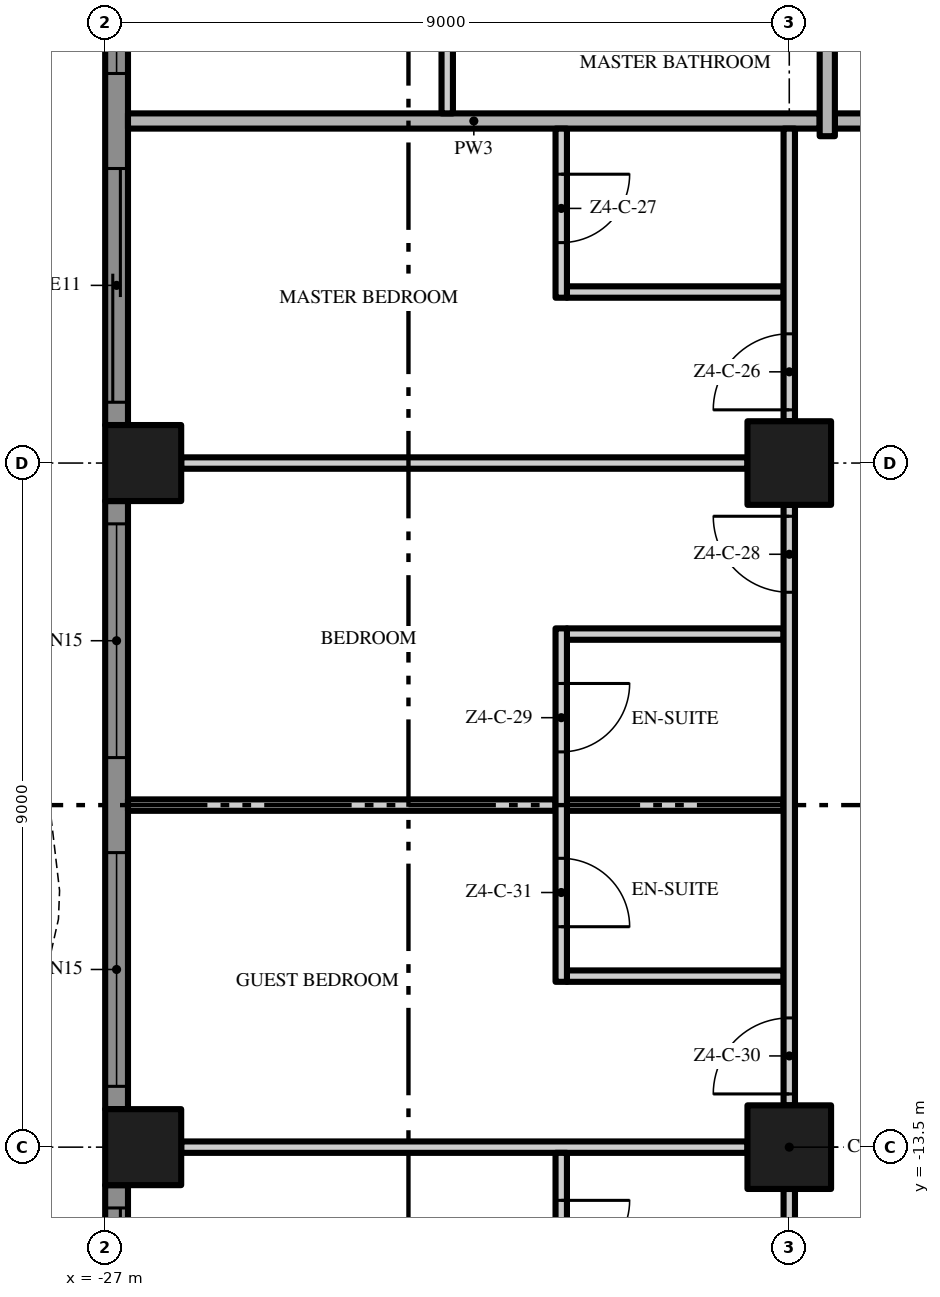
"""IFC4 building model, lengths in metres.
Left out: names, types, materials, properties, quantities, classifications, styles, units other than length and angle.
Written with IfcOpenShell. Run it as: python <this file> out.ifc"""

import sys

from ifc_helpers import new_model, si_unit, direction, frame, frame_2d, origin, origin_2d, place, context, subcontext, project, spatial, polyline, rectangle, outline, extrude, element, fill, save


model = new_model("IFC4")
c1 = context("Model", 3, precision=1e-05, world=origin(), true_north=direction((0.0, 1.0)))
c2 = subcontext(c1, "Body", "Model", "MODEL_VIEW")
j1 = project(units=[si_unit("LENGTHUNIT", "METRE"), si_unit("PLANEANGLEUNIT", "RADIAN")], contexts=[c1])
p1 = place(None, origin())
s1 = spatial("IfcSite", under=j1, at=p1, CompositionType="ELEMENT")
p2 = place(p1, origin())
s2 = spatial("IfcBuilding", under=s1, at=p2, CompositionType="ELEMENT")
p3 = place(p2, frame((0.0, 0.0, 207.2)))
s3 = spatial("IfcBuildingStorey", under=s2, at=p3, CompositionType="ELEMENT", Elevation=207.2)
for number, where, z_axis, x_axis in (
    (1, (-18.0, -13.5, 0.0), (0.0, 0.0, 1.0), (1.0, 0.0, 0.0)),
    (2, (-18.0, -4.5, 0.0), (0.0, 0.0, 1.0), (1.0, 0.0, 0.0)),
):
    element("IfcColumn", number, at=place(p3, frame(where, z_axis=z_axis, x_axis=x_axis)), inside=s3, PredefinedType="COLUMN", context=c2, shape_type="SweptSolid", body=[
        extrude(rectangle(XDim=1.1, YDim=1.1, at=origin_2d()), origin(), (0.0, 0.0, 1.0), 3.5),
    ])
for number, where, z_axis, x_axis in (
    (3, (-26.5, -13.5, 0.0), (0.0, 0.0, 1.0), (1.0, 0.0, 0.0)),
    (4, (-26.5, -4.5, 0.0), (0.0, 0.0, 1.0), (1.0, 0.0, 0.0)),
):
    element("IfcColumn", number, at=place(p3, frame(where, z_axis=z_axis, x_axis=x_axis)), inside=s3, PredefinedType="COLUMN", context=c2, shape_type="SweptSolid", body=[
        extrude(rectangle(XDim=1.0, YDim=1.0, at=origin_2d()), origin(), (0.0, 0.0, 1.0), 3.5),
    ])
p4 = place(p3, frame((-26.85, -4.0, 0.0), z_axis=(0.0, 0.0, 1.0), x_axis=(0.0, 1.0, 0.0)))
e5 = element("IfcWall", 5, at=p4, inside=s3, PredefinedType="SOLIDWALL", context=c2, shape_type="SweptSolid", body=[
    extrude(rectangle(XDim=8.0, YDim=0.3, at=frame_2d((4.0, 0.0))), origin(), (0.0, 0.0, 1.0), 3.5),
])
p5 = place(p4, frame((4.625, 0.0, 0.45)))
e6 = element("IfcOpeningElement", 6, at=p5, cuts=e5, PredefinedType="OPENING", context=c2, shape_type="SweptSolid", body=[
    extrude(rectangle(XDim=3.075, YDim=2.65, at=frame_2d((1.538, 1.325))), frame((0.0, 0.16, 0.0), z_axis=(0.0, -1.0, 0.0), x_axis=(1.0, 0.0, 0.0)), (0.0, 0.0, 1.0), 0.32),
])
p6 = place(p4, frame((0.3, 0.0, 0.0)))
e7 = element("IfcOpeningElement", 7, at=p6, cuts=e5, PredefinedType="OPENING", context=c2, shape_type="SweptSolid", body=[
    extrude(rectangle(XDim=3.075, YDim=2.4, at=frame_2d((1.538, 1.2))), frame((0.0, 0.16, 0.0), z_axis=(0.0, -1.0, 0.0), x_axis=(1.0, 0.0, 0.0)), (0.0, 0.0, 1.0), 0.32),
])
p7 = place(p3, frame((-26.85, -13.0, 0.0), z_axis=(0.0, 0.0, 1.0), x_axis=(0.0, 1.0, 0.0)))
e8 = element("IfcWall", 8, at=p7, inside=s3, PredefinedType="SOLIDWALL", context=c2, shape_type="SweptSolid", body=[
    extrude(rectangle(XDim=8.0, YDim=0.3, at=frame_2d((4.0, 0.0))), origin(), (0.0, 0.0, 1.0), 3.5),
])
p8 = place(p7, frame((4.625, 0.0, 0.45)))
e9 = element("IfcOpeningElement", 9, at=p8, cuts=e8, PredefinedType="OPENING", context=c2, shape_type="SweptSolid", body=[
    extrude(rectangle(XDim=3.075, YDim=2.65, at=frame_2d((1.538, 1.325))), frame((0.0, 0.16, 0.0), z_axis=(0.0, -1.0, 0.0), x_axis=(1.0, 0.0, 0.0)), (0.0, 0.0, 1.0), 0.32),
])
p9 = place(p7, frame((0.3, 0.0, 0.45)))
e10 = element("IfcOpeningElement", 10, at=p9, cuts=e8, PredefinedType="OPENING", context=c2, shape_type="SweptSolid", body=[
    extrude(rectangle(XDim=3.075, YDim=2.65, at=frame_2d((1.538, 1.325))), frame((0.0, 0.16, 0.0), z_axis=(0.0, -1.0, 0.0), x_axis=(1.0, 0.0, 0.0)), (0.0, 0.0, 1.0), 0.32),
])
p10 = place(p3, frame((-26.85, -18.0, 0.0), z_axis=(0.0, 0.0, 1.0), x_axis=(0.0, 1.0, 0.0)))
e11 = element("IfcWall", 11, at=p10, inside=s3, PredefinedType="SOLIDWALL", context=c2, shape_type="SweptSolid", body=[
    extrude(rectangle(XDim=4.0, YDim=0.3, at=frame_2d((2.0, 0.0))), origin(), (0.0, 0.0, 1.0), 3.5),
])
p11 = place(p10, frame((0.625, 0.0, 0.0)))
e12 = element("IfcOpeningElement", 12, at=p11, cuts=e11, PredefinedType="OPENING", context=c2, shape_type="SweptSolid", body=[
    extrude(rectangle(XDim=3.075, YDim=2.4, at=frame_2d((1.538, 1.2))), frame((0.0, 0.16, 0.0), z_axis=(0.0, -1.0, 0.0), x_axis=(1.0, 0.0, 0.0)), (0.0, 0.0, 1.0), 0.32),
])
p12 = place(p3, origin())
e13 = element("IfcWall", 13, at=p12, inside=s3, PredefinedType="USERDEFINED", context=c2, shape_type="SweptSolid", body=[
    extrude(outline(polyline([(-27.951, 18.0), (-28.612, 16.5), (-29.345, 15.0), (-29.869, 13.5), (-30.0, 12.375), (-29.985, 12.0), (-29.649, 10.5), (-28.988, 9.0), (-28.255, 7.5), (-27.731, 6.0), (-27.6, 4.875), (-27.615, 4.5), (-27.951, 3.0), (-28.612, 1.5), (-29.345, 0.0), (-29.869, -1.5), (-30.0, -2.625), (-29.985, -3.0), (-29.649, -4.5), (-28.988, -6.0), (-28.255, -7.5), (-27.731, -9.0), (-27.6, -10.125), (-27.615, -10.5), (-27.951, -12.0), (-28.612, -13.5), (-29.345, -15.0), (-29.869, -16.5), (-30.0, -17.625), (-29.985, -18.0), (-29.735, -17.99), (-29.749, -17.635), (-29.624, -16.556), (-29.114, -15.096), (-28.385, -13.605), (-27.713, -12.079), (-27.366, -10.533), (-27.349, -10.115), (-27.486, -8.944), (-28.024, -7.404), (-28.761, -5.895), (-29.41, -4.421), (-29.736, -2.967), (-29.749, -2.635), (-29.624, -1.556), (-29.114, -0.096), (-28.385, 1.395), (-27.713, 2.921), (-27.366, 4.467), (-27.349, 4.885), (-27.486, 6.056), (-28.024, 7.596), (-28.761, 9.105), (-29.41, 10.579), (-29.736, 12.033), (-29.749, 12.365), (-29.624, 13.444), (-29.114, 14.904), (-28.385, 16.395), (-27.723, 17.899), (-27.951, 18.0)])), origin(), (0.0, 0.0, 1.0), 0.9),
])
p13 = place(p3, frame((-26.0, -13.5, 0.0), z_axis=(0.0, 0.0, 1.0), x_axis=(1.0, 0.0, 0.0)))
e14 = element("IfcWall", 14, at=p13, inside=s3, PredefinedType="PARTITIONING", context=c2, shape_type="SweptSolid", body=[
    extrude(rectangle(XDim=7.45, YDim=0.15, at=frame_2d((3.725, 0.0))), origin(), (0.0, 0.0, 1.0), 3.5),
])
p14 = place(p3, frame((-20.925, -11.25, 0.0), z_axis=(0.0, 0.0, 1.0), x_axis=(1.0, 0.0, 0.0)))
e15 = element("IfcWall", 15, at=p14, inside=s3, PredefinedType="PARTITIONING", context=c2, shape_type="SweptSolid", body=[
    extrude(rectangle(XDim=2.85, YDim=0.15, at=frame_2d((1.425, 0.0))), origin(), (0.0, 0.0, 1.0), 3.5),
])
p15 = place(p3, frame((-26.7, -9.0, 0.0), z_axis=(0.0, 0.0, 1.0), x_axis=(1.0, 0.0, 0.0)))
e16 = element("IfcWall", 16, at=p15, inside=s3, PredefinedType="PARTITIONING", context=c2, shape_type="SweptSolid", body=[
    extrude(rectangle(XDim=5.625, YDim=0.15, at=frame_2d((2.812, 0.0))), origin(), (0.0, 0.0, 1.0), 3.5),
])
for number, where, z_axis, x_axis in (
    (17, (-20.925, -9.0, 0.0), (0.0, 0.0, 1.0), (1.0, 0.0, 0.0)),
    (18, (-20.925, -6.75, 0.0), (0.0, 0.0, 1.0), (1.0, 0.0, 0.0)),
):
    element("IfcWall", number, at=place(p3, frame(where, z_axis=z_axis, x_axis=x_axis)), inside=s3, PredefinedType="PARTITIONING", context=c2, shape_type="SweptSolid", body=[
        extrude(rectangle(XDim=2.85, YDim=0.15, at=frame_2d((1.425, 0.0))), origin(), (0.0, 0.0, 1.0), 3.5),
    ])
p16 = place(p3, frame((-26.0, -4.5, 0.0), z_axis=(0.0, 0.0, 1.0), x_axis=(1.0, 0.0, 0.0)))
e19 = element("IfcWall", 19, at=p16, inside=s3, PredefinedType="PARTITIONING", context=c2, shape_type="SweptSolid", body=[
    extrude(rectangle(XDim=7.45, YDim=0.15, at=frame_2d((3.725, 0.0))), origin(), (0.0, 0.0, 1.0), 3.5),
])
p17 = place(p3, frame((-20.925, -2.25, 0.0), z_axis=(0.0, 0.0, 1.0), x_axis=(1.0, 0.0, 0.0)))
e20 = element("IfcWall", 20, at=p17, inside=s3, PredefinedType="PARTITIONING", context=c2, shape_type="SweptSolid", body=[
    extrude(rectangle(XDim=2.85, YDim=0.15, at=frame_2d((1.425, 0.0))), origin(), (0.0, 0.0, 1.0), 3.5),
])
p18 = place(p3, frame((-17.4, 0.0, 0.0), z_axis=(0.0, 0.0, 1.0), x_axis=(1.0, 0.0, 0.0)))
e21 = element("IfcWall", 21, at=p18, inside=s3, PredefinedType="PARTITIONING", context=c2, shape_type="SweptSolid", body=[
    extrude(rectangle(XDim=12.8, YDim=0.2, at=frame_2d((6.4, 0.0))), origin(), (0.0, 0.0, 1.0), 3.5),
])
p19 = place(p3, frame((-26.7, 0.0, 0.0), z_axis=(0.0, 0.0, 1.0), x_axis=(1.0, 0.0, 0.0)))
e22 = element("IfcWall", 22, at=p19, inside=s3, PredefinedType="PARTITIONING", context=c2, shape_type="SweptSolid", body=[
    extrude(rectangle(XDim=9.1, YDim=0.2, at=frame_2d((4.55, 0.0))), origin(), (0.0, 0.0, 1.0), 3.5),
])
p20 = place(p3, frame((-22.5, 0.1, 0.0), z_axis=(0.0, 0.0, 1.0), x_axis=(0.0, 1.0, 0.0)))
e23 = element("IfcWall", 23, at=p20, inside=s3, PredefinedType="PARTITIONING", context=c2, shape_type="SweptSolid", body=[
    extrude(rectangle(XDim=17.4, YDim=0.15, at=frame_2d((8.7, 0.0))), origin(), (0.0, 0.0, 1.0), 3.5),
])
p21 = place(p20, frame((1.65, 0.0, 0.0)))
e24 = element("IfcOpeningElement", 24, at=p21, cuts=e23, PredefinedType="OPENING", context=c2, shape_type="SweptSolid", body=[
    extrude(rectangle(XDim=1.0, YDim=2.4, at=frame_2d((0.5, 1.2))), frame((0.0, 0.085, 0.0), z_axis=(0.0, -1.0, 0.0), x_axis=(1.0, 0.0, 0.0)), (0.0, 0.0, 1.0), 0.17),
])
p22 = place(p20, frame((7.25, 0.0, 0.0)))
e25 = element("IfcOpeningElement", 25, at=p22, cuts=e23, PredefinedType="OPENING", context=c2, shape_type="SweptSolid", body=[
    extrude(rectangle(XDim=1.0, YDim=2.4, at=frame_2d((0.5, 1.2))), frame((0.0, 0.085, 0.0), z_axis=(0.0, -1.0, 0.0), x_axis=(1.0, 0.0, 0.0)), (0.0, 0.0, 1.0), 0.17),
])
p23 = place(p20, frame((9.5, 0.0, 0.0)))
e26 = element("IfcOpeningElement", 26, at=p23, cuts=e23, PredefinedType="OPENING", context=c2, shape_type="SweptSolid", body=[
    extrude(rectangle(XDim=1.0, YDim=2.4, at=frame_2d((0.5, 1.2))), frame((0.0, 0.085, 0.0), z_axis=(0.0, -1.0, 0.0), x_axis=(1.0, 0.0, 0.0)), (0.0, 0.0, 1.0), 0.17),
])
p24 = place(p20, frame((16.25, 0.0, 0.0)))
e27 = element("IfcOpeningElement", 27, at=p24, cuts=e23, PredefinedType="OPENING", context=c2, shape_type="SweptSolid", body=[
    extrude(rectangle(XDim=1.0, YDim=2.4, at=frame_2d((0.5, 1.2))), frame((0.0, 0.085, 0.0), z_axis=(0.0, -1.0, 0.0), x_axis=(1.0, 0.0, 0.0)), (0.0, 0.0, 1.0), 0.17),
])
p25 = place(p3, frame((-21.0, -13.575, 0.0), z_axis=(0.0, 0.0, 1.0), x_axis=(0.0, -1.0, 0.0)))
e28 = element("IfcWall", 28, at=p25, inside=s3, PredefinedType="PARTITIONING", context=c2, shape_type="SweptSolid", body=[
    extrude(rectangle(XDim=2.25, YDim=0.15, at=frame_2d((1.125, 0.0))), origin(), (0.0, 0.0, 1.0), 3.5),
])
p26 = place(p25, frame((0.625, 0.0, 0.0)))
e29 = element("IfcOpeningElement", 29, at=p26, cuts=e28, PredefinedType="OPENING", context=c2, shape_type="SweptSolid", body=[
    extrude(rectangle(XDim=0.9, YDim=2.1, at=frame_2d((0.45, 1.05))), frame((0.0, 0.085, 0.0), z_axis=(0.0, -1.0, 0.0), x_axis=(1.0, 0.0, 0.0)), (0.0, 0.0, 1.0), 0.17),
])
p27 = place(p3, frame((-21.0, -6.675, 0.0), z_axis=(0.0, 0.0, 1.0), x_axis=(0.0, -1.0, 0.0)))
e30 = element("IfcWall", 30, at=p27, inside=s3, PredefinedType="PARTITIONING", context=c2, shape_type="SweptSolid", body=[
    extrude(rectangle(XDim=4.65, YDim=0.15, at=frame_2d((2.325, 0.0))), origin(), (0.0, 0.0, 1.0), 3.5),
])
p28 = place(p27, frame((0.725, 0.0, 0.0)))
e31 = element("IfcOpeningElement", 31, at=p28, cuts=e30, PredefinedType="OPENING", context=c2, shape_type="SweptSolid", body=[
    extrude(rectangle(XDim=0.9, YDim=2.1, at=frame_2d((0.45, 1.05))), frame((0.0, 0.085, 0.0), z_axis=(0.0, -1.0, 0.0), x_axis=(1.0, 0.0, 0.0)), (0.0, 0.0, 1.0), 0.17),
])
p29 = place(p27, frame((3.025, 0.0, 0.0)))
e32 = element("IfcOpeningElement", 32, at=p29, cuts=e30, PredefinedType="OPENING", context=c2, shape_type="SweptSolid", body=[
    extrude(rectangle(XDim=0.9, YDim=2.1, at=frame_2d((0.45, 1.05))), frame((0.0, 0.085, 0.0), z_axis=(0.0, -1.0, 0.0), x_axis=(1.0, 0.0, 0.0)), (0.0, 0.0, 1.0), 0.17),
])
p30 = place(p3, frame((-21.0, -0.1, 0.0), z_axis=(0.0, 0.0, 1.0), x_axis=(0.0, -1.0, 0.0)))
e33 = element("IfcWall", 33, at=p30, inside=s3, PredefinedType="PARTITIONING", context=c2, shape_type="SweptSolid", body=[
    extrude(rectangle(XDim=2.225, YDim=0.15, at=frame_2d((1.113, 0.0))), origin(), (0.0, 0.0, 1.0), 3.5),
])
p31 = place(p30, frame((0.6, 0.0, 0.0)))
e34 = element("IfcOpeningElement", 34, at=p31, cuts=e33, PredefinedType="OPENING", context=c2, shape_type="SweptSolid", body=[
    extrude(rectangle(XDim=0.9, YDim=2.1, at=frame_2d((0.45, 1.05))), frame((0.0, 0.085, 0.0), z_axis=(0.0, -1.0, 0.0), x_axis=(1.0, 0.0, 0.0)), (0.0, 0.0, 1.0), 0.17),
])
p32 = place(p3, frame((-18.0, -21.5, 0.0), z_axis=(0.0, 0.0, 1.0), x_axis=(0.0, 1.0, 0.0)))
e35 = element("IfcWall", 35, at=p32, inside=s3, PredefinedType="PARTITIONING", context=c2, shape_type="SweptSolid", body=[
    extrude(rectangle(XDim=7.45, YDim=0.15, at=frame_2d((3.725, 0.0))), origin(), (0.0, 0.0, 1.0), 3.5),
])
p33 = place(p32, frame((1.45, 0.0, 0.0)))
e36 = element("IfcOpeningElement", 36, at=p33, cuts=e35, PredefinedType="OPENING", context=c2, shape_type="SweptSolid", body=[
    extrude(rectangle(XDim=1.8, YDim=2.4, at=frame_2d((0.9, 1.2))), frame((0.0, 0.085, 0.0), z_axis=(0.0, -1.0, 0.0), x_axis=(1.0, 0.0, 0.0)), (0.0, 0.0, 1.0), 0.17),
])
p34 = place(p3, frame((-18.0, -12.95, 0.0), z_axis=(0.0, 0.0, 1.0), x_axis=(0.0, 1.0, 0.0)))
e37 = element("IfcWall", 37, at=p34, inside=s3, PredefinedType="PARTITIONING", context=c2, shape_type="SweptSolid", body=[
    extrude(rectangle(XDim=7.9, YDim=0.15, at=frame_2d((3.95, 0.0))), origin(), (0.0, 0.0, 1.0), 3.5),
])
p35 = place(p34, frame((6.75, 0.0, 0.0)))
e38 = element("IfcOpeningElement", 38, at=p35, cuts=e37, PredefinedType="OPENING", context=c2, shape_type="SweptSolid", body=[
    extrude(rectangle(XDim=1.0, YDim=2.4, at=frame_2d((0.5, 1.2))), frame((0.0, 0.085, 0.0), z_axis=(0.0, -1.0, 0.0), x_axis=(1.0, 0.0, 0.0)), (0.0, 0.0, 1.0), 0.17),
])
p36 = place(p34, frame((0.15, 0.0, 0.0)))
e39 = element("IfcOpeningElement", 39, at=p36, cuts=e37, PredefinedType="OPENING", context=c2, shape_type="SweptSolid", body=[
    extrude(rectangle(XDim=1.0, YDim=2.4, at=frame_2d((0.5, 1.2))), frame((0.0, 0.085, 0.0), z_axis=(0.0, -1.0, 0.0), x_axis=(1.0, 0.0, 0.0)), (0.0, 0.0, 1.0), 0.17),
])
p37 = place(p3, frame((-18.0, -3.95, 0.0), z_axis=(0.0, 0.0, 1.0), x_axis=(0.0, 1.0, 0.0)))
e40 = element("IfcWall", 40, at=p37, inside=s3, PredefinedType="PARTITIONING", context=c2, shape_type="SweptSolid", body=[
    extrude(rectangle(XDim=3.85, YDim=0.15, at=frame_2d((1.925, 0.0))), origin(), (0.0, 0.0, 1.0), 3.5),
])
p38 = place(p37, frame((0.15, 0.0, 0.0)))
e41 = element("IfcOpeningElement", 41, at=p38, cuts=e40, PredefinedType="OPENING", context=c2, shape_type="SweptSolid", body=[
    extrude(rectangle(XDim=1.0, YDim=2.4, at=frame_2d((0.5, 1.2))), frame((0.0, 0.085, 0.0), z_axis=(0.0, -1.0, 0.0), x_axis=(1.0, 0.0, 0.0)), (0.0, 0.0, 1.0), 0.17),
])
p39 = place(p3, frame((-17.5, -0.2, 0.0), z_axis=(0.0, 0.0, 1.0), x_axis=(0.0, 1.0, 0.0)))
e42 = element("IfcWall", 42, at=p39, inside=s3, PredefinedType="PARTITIONING", context=c2, shape_type="SweptSolid", body=[
    extrude(rectangle(XDim=4.15, YDim=0.2, at=frame_2d((2.075, 0.0))), origin(), (0.0, 0.0, 1.0), 3.5),
])
p40 = place(p5, origin())
e43 = element("IfcWindow", 43, at=p40, inside=s3, PartitioningType="SINGLE_PANEL", PredefinedType="WINDOW", context=c2, shape_type="SweptSolid", body=[
    extrude(rectangle(XDim=3.075, YDim=2.65, at=frame_2d((1.538, 1.325))), frame((0.0, 0.03, 0.0), z_axis=(0.0, -1.0, 0.0), x_axis=(1.0, 0.0, 0.0)), (0.0, 0.0, 1.0), 0.06),
])
fill(e6, e43)
p41 = place(p6, origin())
e44 = element("IfcDoor", 44, at=p41, inside=s3, OperationType="SINGLE_SWING_LEFT", PredefinedType="DOOR", context=c2, shape_type="SweptSolid", body=[
    extrude(rectangle(XDim=3.075, YDim=2.4, at=frame_2d((1.538, 1.2))), frame((0.0, 0.025, 0.0), z_axis=(0.0, -1.0, 0.0), x_axis=(1.0, 0.0, 0.0)), (0.0, 0.0, 1.0), 0.05),
])
fill(e7, e44)
p42 = place(p8, origin())
e45 = element("IfcWindow", 45, at=p42, inside=s3, PartitioningType="SINGLE_PANEL", PredefinedType="WINDOW", context=c2, shape_type="SweptSolid", body=[
    extrude(rectangle(XDim=3.075, YDim=2.65, at=frame_2d((1.538, 1.325))), frame((0.0, 0.03, 0.0), z_axis=(0.0, -1.0, 0.0), x_axis=(1.0, 0.0, 0.0)), (0.0, 0.0, 1.0), 0.06),
])
fill(e9, e45)
p43 = place(p9, origin())
e46 = element("IfcWindow", 46, at=p43, inside=s3, PartitioningType="SINGLE_PANEL", PredefinedType="WINDOW", context=c2, shape_type="SweptSolid", body=[
    extrude(rectangle(XDim=3.075, YDim=2.65, at=frame_2d((1.538, 1.325))), frame((0.0, 0.03, 0.0), z_axis=(0.0, -1.0, 0.0), x_axis=(1.0, 0.0, 0.0)), (0.0, 0.0, 1.0), 0.06),
])
fill(e10, e46)
p44 = place(p11, origin())
e47 = element("IfcDoor", 47, at=p44, inside=s3, OperationType="SINGLE_SWING_LEFT", PredefinedType="DOOR", context=c2, shape_type="SweptSolid", body=[
    extrude(rectangle(XDim=3.075, YDim=2.4, at=frame_2d((1.538, 1.2))), frame((0.0, 0.025, 0.0), z_axis=(0.0, -1.0, 0.0), x_axis=(1.0, 0.0, 0.0)), (0.0, 0.0, 1.0), 0.05),
])
fill(e12, e47)
p45 = place(p38, origin())
e48 = element("IfcDoor", 48, at=p45, inside=s3, OperationType="SINGLE_SWING_LEFT", PredefinedType="DOOR", context=c2, shape_type="SweptSolid", body=[
    extrude(rectangle(XDim=1.0, YDim=2.4, at=frame_2d((0.5, 1.2))), frame((0.0, 0.025, 0.0), z_axis=(0.0, -1.0, 0.0), x_axis=(1.0, 0.0, 0.0)), (0.0, 0.0, 1.0), 0.05),
])
fill(e41, e48)
p46 = place(p31, origin())
e49 = element("IfcDoor", 49, at=p46, inside=s3, OperationType="SINGLE_SWING_LEFT", PredefinedType="DOOR", context=c2, shape_type="SweptSolid", body=[
    extrude(rectangle(XDim=0.9, YDim=2.1, at=frame_2d((0.45, 1.05))), frame((0.0, 0.025, 0.0), z_axis=(0.0, -1.0, 0.0), x_axis=(1.0, 0.0, 0.0)), (0.0, 0.0, 1.0), 0.05),
])
fill(e34, e49)
p47 = place(p35, origin())
e50 = element("IfcDoor", 50, at=p47, inside=s3, OperationType="SINGLE_SWING_RIGHT", PredefinedType="DOOR", context=c2, shape_type="SweptSolid", body=[
    extrude(rectangle(XDim=1.0, YDim=2.4, at=frame_2d((0.5, 1.2))), frame((0.0, 0.025, 0.0), z_axis=(0.0, -1.0, 0.0), x_axis=(1.0, 0.0, 0.0)), (0.0, 0.0, 1.0), 0.05),
])
fill(e38, e50)
p48 = place(p28, origin())
e51 = element("IfcDoor", 51, at=p48, inside=s3, OperationType="SINGLE_SWING_LEFT", PredefinedType="DOOR", context=c2, shape_type="SweptSolid", body=[
    extrude(rectangle(XDim=0.9, YDim=2.1, at=frame_2d((0.45, 1.05))), frame((0.0, 0.025, 0.0), z_axis=(0.0, -1.0, 0.0), x_axis=(1.0, 0.0, 0.0)), (0.0, 0.0, 1.0), 0.05),
])
fill(e31, e51)
p49 = place(p36, origin())
e52 = element("IfcDoor", 52, at=p49, inside=s3, OperationType="SINGLE_SWING_LEFT", PredefinedType="DOOR", context=c2, shape_type="SweptSolid", body=[
    extrude(rectangle(XDim=1.0, YDim=2.4, at=frame_2d((0.5, 1.2))), frame((0.0, 0.025, 0.0), z_axis=(0.0, -1.0, 0.0), x_axis=(1.0, 0.0, 0.0)), (0.0, 0.0, 1.0), 0.05),
])
fill(e39, e52)
p50 = place(p29, origin())
e53 = element("IfcDoor", 53, at=p50, inside=s3, OperationType="SINGLE_SWING_RIGHT", PredefinedType="DOOR", context=c2, shape_type="SweptSolid", body=[
    extrude(rectangle(XDim=0.9, YDim=2.1, at=frame_2d((0.45, 1.05))), frame((0.0, 0.025, 0.0), z_axis=(0.0, -1.0, 0.0), x_axis=(1.0, 0.0, 0.0)), (0.0, 0.0, 1.0), 0.05),
])
fill(e32, e53)
p51 = place(p26, origin())
e54 = element("IfcDoor", 54, at=p51, inside=s3, OperationType="SINGLE_SWING_LEFT", PredefinedType="DOOR", context=c2, shape_type="SweptSolid", body=[
    extrude(rectangle(XDim=0.9, YDim=2.1, at=frame_2d((0.45, 1.05))), frame((0.0, 0.025, 0.0), z_axis=(0.0, -1.0, 0.0), x_axis=(1.0, 0.0, 0.0)), (0.0, 0.0, 1.0), 0.05),
])
fill(e29, e54)
save(model, sys.argv[1])
